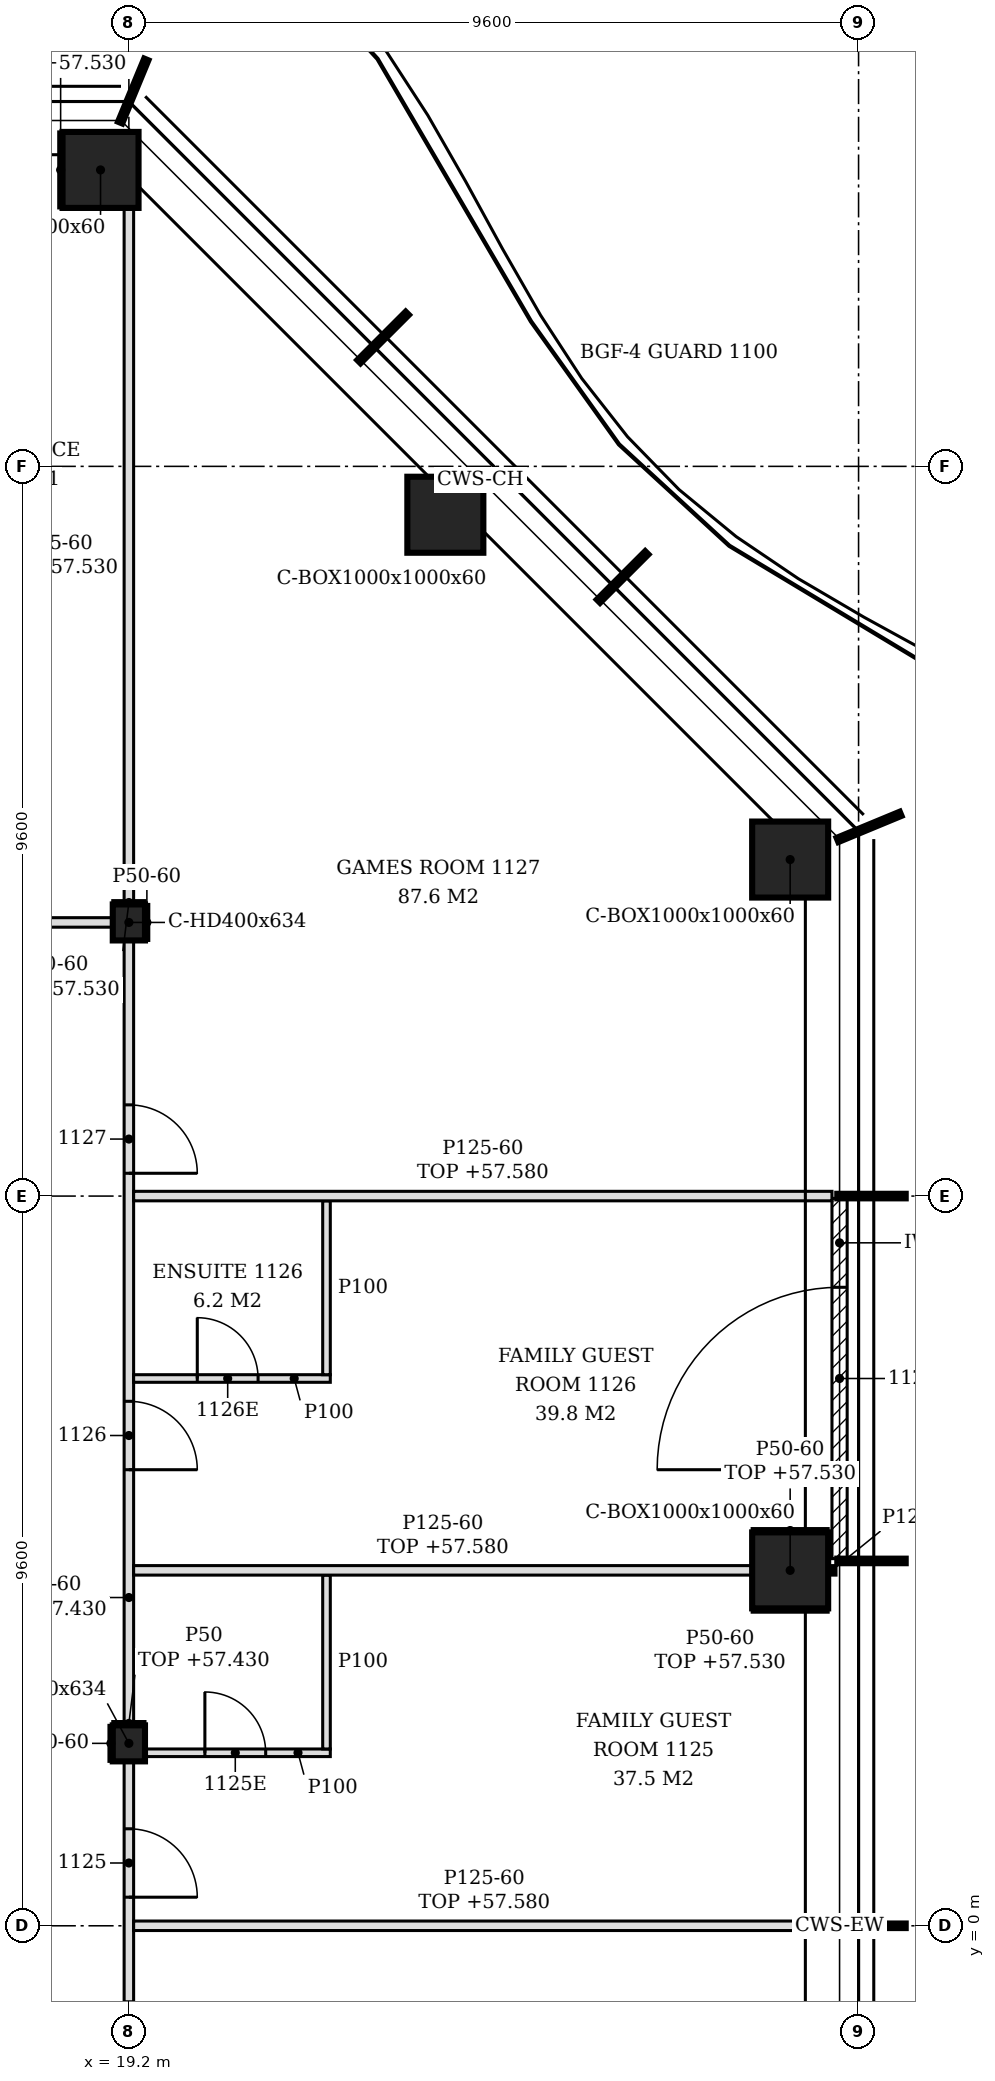
"""IFC4 building model, lengths in metres.
Left out: names, types, materials, properties, quantities, classifications, styles, units other than length and angle.
Written with IfcOpenShell. Run it as: python <this file> out.ifc"""

import sys

from ifc_helpers import new_model, si_unit, direction, frame, frame_2d, origin, origin_2d, place, context, subcontext, project, spatial, polyline, rectangle, hollow_rectangle, i_section, outline, extrude, element, fill, save


model = new_model("IFC4")
c1 = context("Model", 3, precision=1e-05, world=origin(), true_north=direction((0.0, 1.0)))
c2 = subcontext(c1, "Body", "Model", "MODEL_VIEW")
j1 = project(units=[si_unit("LENGTHUNIT", "METRE"), si_unit("PLANEANGLEUNIT", "RADIAN")], contexts=[c1])
p1 = place(None, origin())
s1 = spatial("IfcSite", under=j1, at=p1, CompositionType="ELEMENT")
p2 = place(p1, origin())
s2 = spatial("IfcBuilding", under=s1, at=p2, CompositionType="ELEMENT")
p3 = place(p2, frame((0.0, 0.0, 54.6)))
s3 = spatial("IfcBuildingStorey", under=s2, at=p3, CompositionType="ELEMENT", Elevation=54.6)
for number, where, z_axis, x_axis in (
    (1, (27.9, 4.676, -0.15), (0.0, 0.0, 1.0), (1.0, 0.0, 0.0)),
    (2, (27.9, 14.027, -0.15), (0.0, 0.0, 1.0), (1.0, 0.0, 0.0)),
    (3, (23.364, 18.564, -0.15), (0.0, 0.0, 1.0), (1.0, 0.0, 0.0)),
    (4, (18.827, 23.1, -0.15), (0.0, 0.0, 1.0), (1.0, 0.0, 0.0)),
):
    element("IfcColumn", number, at=place(p3, frame(where, z_axis=z_axis, x_axis=x_axis)), inside=s3, PredefinedType="COLUMN", context=c2, shape_type="SweptSolid", body=[
        extrude(hollow_rectangle(XDim=1.0, YDim=1.0, WallThickness=0.06, at=origin_2d()), origin(), (0.0, 0.0, 1.0), 3.6),
    ])
for number, where, z_axis, x_axis in (
    (5, (19.2, 2.4, -0.15), (0.0, 0.0, 1.0), (1.0, 0.0, 0.0)),
    (6, (19.2, 13.2, -0.15), (0.0, 0.0, 1.0), (1.0, 0.0, 0.0)),
):
    element("IfcColumn", number, at=place(p3, frame(where, z_axis=z_axis, x_axis=x_axis)), inside=s3, PredefinedType="COLUMN", context=c2, shape_type="SweptSolid", body=[
        extrude(i_section(OverallWidth=0.424, OverallDepth=0.474, WebThickness=0.048, FlangeThickness=0.077, FilletRadius=0.015, at=origin_2d()), origin(), (0.0, 0.0, 1.0), 3.6),
    ])
p4 = place(p3, frame((28.55, 4.83, 0.0), z_axis=(0.0, 0.0, 1.0), x_axis=(0.0, 1.0, 0.0)))
e7 = element("IfcWall", 7, at=p4, inside=s3, PredefinedType="NOTDEFINED", context=c2, shape_type="SweptSolid", body=[
    extrude(rectangle(XDim=4.74, YDim=0.2, at=frame_2d((2.37, 0.0))), origin(), (0.0, 0.0, 1.0), 3.45),
])
p5 = place(p4, frame((1.17, 0.0, 0.0)))
e8 = element("IfcOpeningElement", 8, at=p5, cuts=e7, PredefinedType="OPENING", context=c2, shape_type="SweptSolid", body=[
    extrude(rectangle(XDim=2.4, YDim=2.4, at=frame_2d((1.2, 1.2))), frame((0.0, 0.11, 0.0), z_axis=(0.0, -1.0, 0.0), x_axis=(1.0, 0.0, 0.0)), (0.0, 0.0, 1.0), 0.22),
])
p6 = place(p3, frame((19.2, -8.163, 0.0), z_axis=(0.0, 0.0, 1.0), x_axis=(0.0, 1.0, 0.0)))
e9 = element("IfcWall", 9, at=p6, inside=s3, PredefinedType="PARTITIONING", context=c2, shape_type="SweptSolid", body=[
    extrude(rectangle(XDim=10.326, YDim=0.125, at=frame_2d((5.163, 0.0))), origin(), (0.0, 0.0, 1.0), 2.83),
])
p7 = place(p6, frame((2.287, 0.0, 0.0)))
e10 = element("IfcOpeningElement", 10, at=p7, cuts=e9, PredefinedType="OPENING", context=c2, shape_type="SweptSolid", body=[
    extrude(rectangle(XDim=0.9, YDim=2.1, at=frame_2d((0.45, 1.05))), frame((0.0, 0.073, 0.0), z_axis=(0.0, -1.0, 0.0), x_axis=(1.0, 0.0, 0.0)), (0.0, 0.0, 1.0), 0.145),
])
p8 = place(p6, frame((6.263, 0.0, 0.0)))
e11 = element("IfcOpeningElement", 11, at=p8, cuts=e9, PredefinedType="OPENING", context=c2, shape_type="SweptSolid", body=[
    extrude(rectangle(XDim=0.9, YDim=2.1, at=frame_2d((0.45, 1.05))), frame((0.0, 0.073, 0.0), z_axis=(0.0, -1.0, 0.0), x_axis=(1.0, 0.0, 0.0)), (0.0, 0.0, 1.0), 0.145),
])
p9 = place(p6, frame((8.539, 0.0, 0.0)))
e12 = element("IfcOpeningElement", 12, at=p9, cuts=e9, PredefinedType="OPENING", context=c2, shape_type="SweptSolid", body=[
    extrude(rectangle(XDim=0.9, YDim=2.1, at=frame_2d((0.45, 1.05))), frame((0.0, 0.073, 0.0), z_axis=(0.0, -1.0, 0.0), x_axis=(1.0, 0.0, 0.0)), (0.0, 0.0, 1.0), 0.145),
])
p10 = place(p3, frame((19.262, 0.0, 0.0), z_axis=(0.0, 0.0, 1.0), x_axis=(1.0, 0.0, 0.0)))
e13 = element("IfcWall", 13, at=p10, inside=s3, PredefinedType="PARTITIONING", context=c2, shape_type="SweptSolid", body=[
    extrude(outline(polyline([(0.0, 0.0), (9.228, 0.0), (9.228, 2.98), (8.788, 2.98), (8.785, 2.93), (8.488, 2.93), (8.486, 2.98), (0.087, 2.98), (0.085, 2.83), (0.0, 2.83), (0.0, 0.0)])), frame((0.0, 0.062, 0.0), z_axis=(0.0, -1.0, 0.0), x_axis=(1.0, 0.0, 0.0)), (0.0, 0.0, 1.0), 0.125),
])
p11 = place(p3, frame((19.412, 2.276, 0.0), z_axis=(0.0, 0.0, 1.0), x_axis=(1.0, 0.0, 0.0)))
e14 = element("IfcWall", 14, at=p11, inside=s3, PredefinedType="PARTITIONING", context=c2, shape_type="SweptSolid", body=[
    extrude(rectangle(XDim=2.438, YDim=0.1, at=frame_2d((1.219, 0.0))), origin(), (0.0, 0.0, 1.0), 3.45),
])
p12 = place(p11, frame((0.788, 0.0, 0.0)))
e15 = element("IfcOpeningElement", 15, at=p12, cuts=e14, PredefinedType="OPENING", context=c2, shape_type="SweptSolid", body=[
    extrude(rectangle(XDim=0.8, YDim=2.1, at=frame_2d((0.4, 1.05))), frame((0.0, 0.06, 0.0), z_axis=(0.0, -1.0, 0.0), x_axis=(1.0, 0.0, 0.0)), (0.0, 0.0, 1.0), 0.12),
])
p13 = place(p3, frame((21.8, 2.326, 0.0), z_axis=(0.0, 0.0, 1.0), x_axis=(0.0, 1.0, 0.0)))
e16 = element("IfcWall", 16, at=p13, inside=s3, PredefinedType="PARTITIONING", context=c2, shape_type="SweptSolid", body=[
    extrude(rectangle(XDim=2.288, YDim=0.1, at=frame_2d((1.144, 0.0))), origin(), (0.0, 0.0, 1.0), 3.45),
])
p14 = place(p3, frame((19.2, 2.637, 0.0), z_axis=(0.0, 0.0, 1.0), x_axis=(0.0, 1.0, 0.0)))
e17 = element("IfcWall", 17, at=p14, inside=s3, PredefinedType="PARTITIONING", context=c2, shape_type="SweptSolid", body=[
    extrude(rectangle(XDim=10.326, YDim=0.125, at=frame_2d((5.163, 0.0))), origin(), (0.0, 0.0, 1.0), 2.83),
])
p15 = place(p14, frame((3.363, 0.0, 0.0)))
e18 = element("IfcOpeningElement", 18, at=p15, cuts=e17, PredefinedType="OPENING", context=c2, shape_type="SweptSolid", body=[
    extrude(rectangle(XDim=0.9, YDim=2.1, at=frame_2d((0.45, 1.05))), frame((0.0, 0.073, 0.0), z_axis=(0.0, -1.0, 0.0), x_axis=(1.0, 0.0, 0.0)), (0.0, 0.0, 1.0), 0.145),
])
p16 = place(p14, frame((7.263, 0.0, 0.0)))
e19 = element("IfcOpeningElement", 19, at=p16, cuts=e17, PredefinedType="OPENING", context=c2, shape_type="SweptSolid", body=[
    extrude(rectangle(XDim=0.9, YDim=2.1, at=frame_2d((0.45, 1.05))), frame((0.0, 0.073, 0.0), z_axis=(0.0, -1.0, 0.0), x_axis=(1.0, 0.0, 0.0)), (0.0, 0.0, 1.0), 0.145),
])
p17 = place(p3, frame((19.262, 4.676, 0.0), z_axis=(0.0, 0.0, 1.0), x_axis=(1.0, 0.0, 0.0)))
e20 = element("IfcWall", 20, at=p17, inside=s3, PredefinedType="PARTITIONING", context=c2, shape_type="SweptSolid", body=[
    extrude(outline(polyline([(0.0, 0.0), (8.137, 0.0), (8.137, 2.98), (0.087, 2.98), (0.085, 2.83), (0.0, 2.83), (0.0, 0.0)])), frame((0.0, 0.062, 0.0), z_axis=(0.0, -1.0, 0.0), x_axis=(1.0, 0.0, 0.0)), (0.0, 0.0, 1.0), 0.125),
])
p18 = place(p3, frame((28.4, 4.676, 0.0), z_axis=(0.0, 0.0, 1.0), x_axis=(1.0, 0.0, 0.0)))
e21 = element("IfcWall", 21, at=p18, inside=s3, PredefinedType="PARTITIONING", context=c2, shape_type="SweptSolid", body=[
    extrude(rectangle(XDim=0.103, YDim=0.125, at=frame_2d((0.052, 0.0))), origin(), (0.0, 0.0, 1.0), 3.45),
])
p19 = place(p3, frame((19.262, 7.2, 0.0), z_axis=(0.0, 0.0, 1.0), x_axis=(1.0, 0.0, 0.0)))
e22 = element("IfcWall", 22, at=p19, inside=s3, PredefinedType="PARTITIONING", context=c2, shape_type="SweptSolid", body=[
    extrude(outline(polyline([(0.0, 0.0), (2.588, 0.0), (2.587, 3.45), (0.087, 3.45), (0.085, 2.83), (0.0, 2.83), (0.0, 0.0)])), frame((0.0, 0.05, 0.0), z_axis=(0.0, -1.0, 0.0), x_axis=(1.0, 0.0, 0.0)), (0.0, 0.0, 1.0), 0.1),
])
p20 = place(p19, frame((0.837, 0.0, 0.0)))
e23 = element("IfcOpeningElement", 23, at=p20, cuts=e22, PredefinedType="OPENING", context=c2, shape_type="SweptSolid", body=[
    extrude(rectangle(XDim=0.8, YDim=2.1, at=frame_2d((0.4, 1.05))), frame((0.0, 0.06, 0.0), z_axis=(0.0, -1.0, 0.0), x_axis=(1.0, 0.0, 0.0)), (0.0, 0.0, 1.0), 0.12),
])
p21 = place(p3, frame((21.8, 7.25, 0.0), z_axis=(0.0, 0.0, 1.0), x_axis=(0.0, 1.0, 0.0)))
e24 = element("IfcWall", 24, at=p21, inside=s3, PredefinedType="PARTITIONING", context=c2, shape_type="SweptSolid", body=[
    extrude(outline(polyline([(0.0, 0.0), (2.288, 0.0), (2.288, 2.98), (2.255, 2.98), (2.253, 3.45), (0.0, 3.45), (0.0, 0.0)])), frame((0.0, 0.05, 0.0), z_axis=(0.0, -1.0, 0.0), x_axis=(1.0, 0.0, 0.0)), (0.0, 0.0, 1.0), 0.1),
])
p22 = place(p3, frame((19.262, 9.6, 0.0), z_axis=(0.0, 0.0, 1.0), x_axis=(1.0, 0.0, 0.0)))
e25 = element("IfcWall", 25, at=p22, inside=s3, PredefinedType="PARTITIONING", context=c2, shape_type="SweptSolid", body=[
    extrude(outline(polyline([(0.0, 0.0), (9.188, 0.0), (9.188, 2.98), (8.788, 2.98), (8.785, 2.93), (8.488, 2.93), (8.486, 2.98), (0.087, 2.98), (0.085, 2.83), (0.0, 2.83), (0.0, 0.0)])), frame((0.0, 0.062, 0.0), z_axis=(0.0, -1.0, 0.0), x_axis=(1.0, 0.0, 0.0)), (0.0, 0.0, 1.0), 0.125),
])
p23 = place(p3, frame((7.412, 13.2, 0.0), z_axis=(0.0, 0.0, 1.0), x_axis=(1.0, 0.0, 0.0)))
e26 = element("IfcWall", 26, at=p23, inside=s3, PredefinedType="PARTITIONING", context=c2, shape_type="SweptSolid", body=[
    extrude(rectangle(XDim=11.576, YDim=0.125, at=frame_2d((5.788, 0.0))), origin(), (0.0, 0.0, 1.0), 2.83),
])
p24 = place(p23, frame((4.602, 0.0, 0.0)))
e27 = element("IfcOpeningElement", 27, at=p24, cuts=e26, PredefinedType="OPENING", context=c2, shape_type="SweptSolid", body=[
    extrude(rectangle(XDim=0.9, YDim=2.1, at=frame_2d((0.45, 1.05))), frame((0.0, 0.073, 0.0), z_axis=(0.0, -1.0, 0.0), x_axis=(1.0, 0.0, 0.0)), (0.0, 0.0, 1.0), 0.145),
])
p25 = place(p23, frame((7.288, 0.0, 0.0)))
e28 = element("IfcOpeningElement", 28, at=p25, cuts=e26, PredefinedType="OPENING", context=c2, shape_type="SweptSolid", body=[
    extrude(rectangle(XDim=0.9, YDim=2.1, at=frame_2d((0.45, 1.05))), frame((0.0, 0.073, 0.0), z_axis=(0.0, -1.0, 0.0), x_axis=(1.0, 0.0, 0.0)), (0.0, 0.0, 1.0), 0.145),
])
p26 = place(p3, frame((19.2, 13.437, 0.0), z_axis=(0.0, 0.0, 1.0), x_axis=(0.0, 1.0, 0.0)))
e29 = element("IfcWall", 29, at=p26, inside=s3, PredefinedType="PARTITIONING", context=c2, shape_type="SweptSolid", body=[
    extrude(outline(polyline([(0.0, 0.0), (9.163, 0.0), (9.163, 2.63), (8.733, 2.63), (8.731, 2.93), (0.0, 2.93), (0.0, 0.0)])), frame((0.0, 0.062, 0.0), z_axis=(0.0, -1.0, 0.0), x_axis=(1.0, 0.0, 0.0)), (0.0, 0.0, 1.0), 0.125),
])
p27 = place(p3, frame((18.963, 2.163, 0.0), z_axis=(0.0, 0.0, 1.0), x_axis=(0.0, 1.0, 0.0)))
e30 = element("IfcWall", 30, at=p27, inside=s3, PredefinedType="PARTITIONING", context=c2, shape_type="SweptSolid", body=[
    extrude(rectangle(XDim=0.474, YDim=0.05, at=frame_2d((0.237, 0.0))), origin(), (0.0, 0.0, 1.0), 3.45),
])
p28 = place(p3, frame((19.437, 12.963, 0.0), z_axis=(0.0, 0.0, 1.0), x_axis=(0.0, 1.0, 0.0)))
e31 = element("IfcWall", 31, at=p28, inside=s3, PredefinedType="PARTITIONING", context=c2, shape_type="SweptSolid", body=[
    extrude(rectangle(XDim=0.474, YDim=0.05, at=frame_2d((0.237, 0.0))), origin(), (0.0, 0.0, 1.0), 3.45),
])
p29 = place(p3, frame((18.988, 2.662, 0.0), z_axis=(0.0, 0.0, 1.0), x_axis=(1.0, 0.0, 0.0)))
e32 = element("IfcWall", 32, at=p29, inside=s3, PredefinedType="PARTITIONING", context=c2, shape_type="SweptSolid", body=[
    extrude(rectangle(XDim=0.424, YDim=0.05, at=frame_2d((0.212, 0.0))), origin(), (0.0, 0.0, 1.0), 2.83),
])
for number, where, z_axis, x_axis in (
    (33, (27.4, 5.201, 0.0), (0.0, 0.0, 1.0), (1.0, 0.0, 0.0)),
    (34, (27.4, 4.151, 0.0), (0.0, 0.0, 1.0), (1.0, 0.0, 0.0)),
):
    element("IfcWall", number, at=place(p3, frame(where, z_axis=z_axis, x_axis=x_axis)), inside=s3, PredefinedType="PARTITIONING", context=c2, shape_type="SweptSolid", body=[
        extrude(rectangle(XDim=1.0, YDim=0.05, at=frame_2d((0.5, 0.0))), origin(), (0.0, 0.0, 1.0), 2.93),
    ])
p30 = place(p3, frame((18.988, 13.462, 0.0), z_axis=(0.0, 0.0, 1.0), x_axis=(1.0, 0.0, 0.0)))
e35 = element("IfcWall", 35, at=p30, inside=s3, PredefinedType="PARTITIONING", context=c2, shape_type="SweptSolid", body=[
    extrude(rectangle(XDim=0.424, YDim=0.05, at=frame_2d((0.212, 0.0))), origin(), (0.0, 0.0, 1.0), 2.93),
])
p31 = place(p3, frame((18.302, 22.6, 0.0), z_axis=(0.0, 0.0, 1.0), x_axis=(0.0, 1.0, 0.0)))
e36 = element("IfcWall", 36, at=p31, inside=s3, PredefinedType="PARTITIONING", context=c2, shape_type="SweptSolid", body=[
    extrude(rectangle(XDim=1.0, YDim=0.05, at=frame_2d((0.5, 0.0))), origin(), (0.0, 0.0, 1.0), 2.93),
])
p32 = place(p5, origin())
e37 = element("IfcDoor", 37, at=p32, inside=s3, OperationType="SINGLE_SWING_LEFT", PredefinedType="DOOR", context=c2, shape_type="SweptSolid", body=[
    extrude(rectangle(XDim=2.4, YDim=2.4, at=frame_2d((1.2, 1.2))), frame((0.0, 0.025, 0.0), z_axis=(0.0, -1.0, 0.0), x_axis=(1.0, 0.0, 0.0)), (0.0, 0.0, 1.0), 0.05),
])
fill(e8, e37)
p33 = place(p9, frame((0.9, 0.0, 0.0), z_axis=(0.0, 0.0, 1.0), x_axis=(-1.0, 0.0, 0.0)))
e38 = element("IfcDoor", 38, at=p33, inside=s3, OperationType="SINGLE_SWING_RIGHT", PredefinedType="DOOR", context=c2, shape_type="SweptSolid", body=[
    extrude(rectangle(XDim=0.9, YDim=2.1, at=frame_2d((0.45, 1.05))), frame((0.0, 0.025, 0.0), z_axis=(0.0, -1.0, 0.0), x_axis=(1.0, 0.0, 0.0)), (0.0, 0.0, 1.0), 0.05),
])
fill(e12, e38)
p34 = place(p12, origin())
e39 = element("IfcDoor", 39, at=p34, inside=s3, OperationType="SINGLE_SWING_LEFT", PredefinedType="DOOR", context=c2, shape_type="SweptSolid", body=[
    extrude(rectangle(XDim=0.8, YDim=2.1, at=frame_2d((0.4, 1.05))), frame((0.0, 0.025, 0.0), z_axis=(0.0, -1.0, 0.0), x_axis=(1.0, 0.0, 0.0)), (0.0, 0.0, 1.0), 0.05),
])
fill(e15, e39)
p35 = place(p15, frame((0.9, 0.0, 0.0), z_axis=(0.0, 0.0, 1.0), x_axis=(-1.0, 0.0, 0.0)))
e40 = element("IfcDoor", 40, at=p35, inside=s3, OperationType="SINGLE_SWING_RIGHT", PredefinedType="DOOR", context=c2, shape_type="SweptSolid", body=[
    extrude(rectangle(XDim=0.9, YDim=2.1, at=frame_2d((0.45, 1.05))), frame((0.0, 0.025, 0.0), z_axis=(0.0, -1.0, 0.0), x_axis=(1.0, 0.0, 0.0)), (0.0, 0.0, 1.0), 0.05),
])
fill(e18, e40)
p36 = place(p20, origin())
e41 = element("IfcDoor", 41, at=p36, inside=s3, OperationType="SINGLE_SWING_LEFT", PredefinedType="DOOR", context=c2, shape_type="SweptSolid", body=[
    extrude(rectangle(XDim=0.8, YDim=2.1, at=frame_2d((0.4, 1.05))), frame((0.0, 0.025, 0.0), z_axis=(0.0, -1.0, 0.0), x_axis=(1.0, 0.0, 0.0)), (0.0, 0.0, 1.0), 0.05),
])
fill(e23, e41)
p37 = place(p16, frame((0.9, 0.0, 0.0), z_axis=(0.0, 0.0, 1.0), x_axis=(-1.0, 0.0, 0.0)))
e42 = element("IfcDoor", 42, at=p37, inside=s3, OperationType="SINGLE_SWING_RIGHT", PredefinedType="DOOR", context=c2, shape_type="SweptSolid", body=[
    extrude(rectangle(XDim=0.9, YDim=2.1, at=frame_2d((0.45, 1.05))), frame((0.0, 0.025, 0.0), z_axis=(0.0, -1.0, 0.0), x_axis=(1.0, 0.0, 0.0)), (0.0, 0.0, 1.0), 0.05),
])
fill(e19, e42)
save(model, sys.argv[1])
